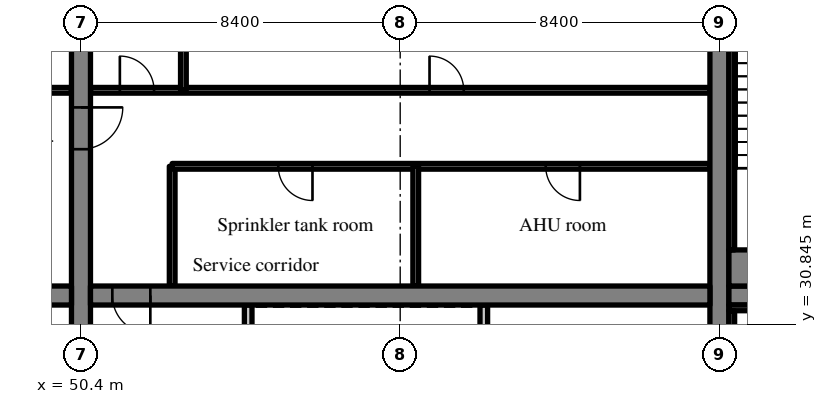
"""IFC4 building model, lengths in metres.
Left out: names, types, materials, properties, quantities, classifications, styles, units other than length and angle.
Written with IfcOpenShell. Run it as: python <this file> out.ifc"""

import sys

from ifc_helpers import new_model, si_unit, direction, frame, frame_2d, origin, place, context, subcontext, project, spatial, rectangle, extrude, source, transform, mapped, element, fill, save


model = new_model("IFC4")
c1 = context("Model", 3, precision=1e-05, world=origin(), true_north=direction((0.0, 1.0)))
c2 = subcontext(c1, "Body", "Model", "MODEL_VIEW")
j1 = project(units=[si_unit("LENGTHUNIT", "METRE"), si_unit("PLANEANGLEUNIT", "RADIAN")], contexts=[c1])
p1 = place(None, origin())
s1 = spatial("IfcSite", under=j1, at=p1, CompositionType="ELEMENT")
p2 = place(p1, origin())
s2 = spatial("IfcBuilding", under=s1, at=p2, CompositionType="ELEMENT")
p3 = place(p2, frame((0.0, 0.0, 140.8)))
s3 = spatial("IfcBuildingStorey", under=s2, at=p3, CompositionType="ELEMENT", Elevation=140.8)
m1 = source(origin(), c2, "Body", "SweptSolid", [
    extrude(rectangle(XDim=18.2, YDim=0.5, at=frame_2d((9.1, 0.0))), origin(), (0.0, 0.0, 1.0), 5.12),
])
p4 = place(p3, frame((50.4, 22.9, 0.0), z_axis=(0.0, 0.0, 1.0), x_axis=(0.0, 1.0, 0.0)))
e1 = element("IfcWall", 1, at=p4, inside=s3, PredefinedType="SHEAR", context=c2, shape_type="MappedRepresentation", body=[
    mapped(m1, transform((0.0, 0.0, 0.0), scale=1.0)),
])
m2 = source(origin(), c2, "Body", "SweptSolid", [
    extrude(rectangle(XDim=1.1, YDim=2.1, at=frame_2d((0.55, 1.05))), frame((0.0, 0.26, 0.0), z_axis=(0.0, -1.0, 0.0), x_axis=(1.0, 0.0, 0.0)), (0.0, 0.0, 1.0), 0.52),
])
p5 = place(p4, frame((12.55, 0.0, 0.0)))
e2 = element("IfcOpeningElement", 2, at=p5, cuts=e1, PredefinedType="OPENING", context=c2, shape_type="MappedRepresentation", body=[
    mapped(m2, transform((0.0, 0.0, 0.0), scale=1.0)),
])
p6 = place(p3, frame((67.2, 22.9, 0.0), z_axis=(0.0, 0.0, 1.0), x_axis=(0.0, 1.0, 0.0)))
e3 = element("IfcWall", 3, at=p6, inside=s3, PredefinedType="SHEAR", context=c2, shape_type="MappedRepresentation", body=[
    mapped(m1, transform((0.0, 0.0, 0.0), scale=1.0)),
])
m3 = source(origin(), c2, "Body", "SweptSolid", [
    extrude(rectangle(XDim=16.3, YDim=0.5, at=frame_2d((8.15, 0.0))), origin(), (0.0, 0.0, 1.0), 5.12),
])
p7 = place(p3, frame((33.85, 31.6, 0.0), z_axis=(0.0, 0.0, 1.0), x_axis=(1.0, 0.0, 0.0)))
e4 = element("IfcWall", 4, at=p7, inside=s3, PredefinedType="SHEAR", context=c2, shape_type="MappedRepresentation", body=[
    mapped(m3, transform((0.0, 0.0, 0.0), scale=1.0)),
])
m4 = source(origin(), c2, "Body", "SweptSolid", [
    extrude(rectangle(XDim=1.0, YDim=2.1, at=frame_2d((0.5, 1.05))), frame((0.0, 0.26, 0.0), z_axis=(0.0, -1.0, 0.0), x_axis=(1.0, 0.0, 0.0)), (0.0, 0.0, 1.0), 0.52),
])
p8 = place(p7, frame((14.725, 0.0, 0.0)))
e5 = element("IfcOpeningElement", 5, at=p8, cuts=e4, PredefinedType="OPENING", context=c2, shape_type="MappedRepresentation", body=[
    mapped(m4, transform((0.0, 0.0, 0.0), scale=1.0)),
])
m5 = source(origin(), c2, "Body", "SweptSolid", [
    extrude(rectangle(XDim=16.3, YDim=0.5, at=frame_2d((8.15, 0.0))), origin(), (0.0, 0.0, 1.0), 5.12),
])
p9 = place(p3, frame((50.65, 31.6, 0.0), z_axis=(0.0, 0.0, 1.0), x_axis=(1.0, 0.0, 0.0)))
e6 = element("IfcWall", 6, at=p9, inside=s3, PredefinedType="SHEAR", context=c2, shape_type="MappedRepresentation", body=[
    mapped(m5, transform((0.0, 0.0, 0.0), scale=1.0)),
])
p10 = place(p9, frame((0.575, 0.0, 0.0)))
e7 = element("IfcOpeningElement", 7, at=p10, cuts=e6, PredefinedType="OPENING", context=c2, shape_type="MappedRepresentation", body=[
    mapped(m4, transform((0.0, 0.0, 0.0), scale=1.0)),
])
m6 = source(origin(), c2, "Body", "SweptSolid", [
    extrude(rectangle(XDim=7.25, YDim=0.5, at=frame_2d((3.625, 0.0))), origin(), (0.0, 0.0, 1.0), 5.12),
])
p11 = place(p3, frame((67.45, 31.6, 0.0), z_axis=(0.0, 0.0, 1.0), x_axis=(1.0, 0.0, 0.0)))
e8 = element("IfcWall", 8, at=p11, inside=s3, PredefinedType="SHEAR", context=c2, shape_type="MappedRepresentation", body=[
    mapped(m6, transform((0.0, 0.0, 0.0), scale=1.0)),
])
p12 = place(p11, frame((5.575, 0.0, 0.0)))
e9 = element("IfcOpeningElement", 9, at=p12, cuts=e8, PredefinedType="OPENING", context=c2, shape_type="MappedRepresentation", body=[
    mapped(m2, transform((0.0, 0.0, 0.0), scale=1.0)),
])
m7 = source(origin(), c2, "Body", "SweptSolid", [
    extrude(rectangle(XDim=16.3, YDim=0.15, at=frame_2d((8.15, 0.0))), origin(), (0.0, 0.0, 1.0), 5.12),
])
p13 = place(p3, frame((33.85, 37.0, 0.0), z_axis=(0.0, 0.0, 1.0), x_axis=(1.0, 0.0, 0.0)))
e10 = element("IfcWall", 10, at=p13, inside=s3, PredefinedType="PARTITIONING", context=c2, shape_type="MappedRepresentation", body=[
    mapped(m7, transform((0.0, 0.0, 0.0), scale=1.0)),
])
m8 = source(origin(), c2, "Body", "SweptSolid", [
    extrude(rectangle(XDim=0.9, YDim=2.1, at=frame_2d((0.45, 1.05))), frame((0.0, 0.085, 0.0), z_axis=(0.0, -1.0, 0.0), x_axis=(1.0, 0.0, 0.0)), (0.0, 0.0, 1.0), 0.17),
])
p14 = place(p13, frame((0.773, 0.0, 0.0)))
e11 = element("IfcOpeningElement", 11, at=p14, cuts=e10, PredefinedType="OPENING", context=c2, shape_type="MappedRepresentation", body=[
    mapped(m8, transform((0.0, 0.0, 0.0), scale=1.0)),
])
p15 = place(p13, frame((3.625, 0.0, 0.0)))
e12 = element("IfcOpeningElement", 12, at=p15, cuts=e10, PredefinedType="OPENING", context=c2, shape_type="MappedRepresentation", body=[
    mapped(m8, transform((0.0, 0.0, 0.0), scale=1.0)),
])
p16 = place(p13, frame((9.33, 0.0, 0.0)))
e13 = element("IfcOpeningElement", 13, at=p16, cuts=e10, PredefinedType="OPENING", context=c2, shape_type="MappedRepresentation", body=[
    mapped(m8, transform((0.0, 0.0, 0.0), scale=1.0)),
])
p17 = place(p13, frame((14.627, 0.0, 0.0)))
e14 = element("IfcOpeningElement", 14, at=p17, cuts=e10, PredefinedType="OPENING", context=c2, shape_type="MappedRepresentation", body=[
    mapped(m8, transform((0.0, 0.0, 0.0), scale=1.0)),
])
m9 = source(origin(), c2, "Body", "SweptSolid", [
    extrude(rectangle(XDim=2.55, YDim=0.2, at=frame_2d((1.275, 0.0))), origin(), (0.0, 0.0, 1.0), 5.12),
])
for number, where, z_axis, x_axis in (
    (15, (54.8, 28.8, 0.0), (0.0, 0.0, 1.0), (0.0, 1.0, 0.0)),
    (16, (61.0, 28.8, 0.0), (0.0, 0.0, 1.0), (0.0, 1.0, 0.0)),
):
    element("IfcWall", number, at=place(p3, frame(where, z_axis=z_axis, x_axis=x_axis)), inside=s3, PredefinedType="SOLIDWALL", context=c2, shape_type="MappedRepresentation", body=[
        mapped(m9, transform((0.0, 0.0, 0.0), scale=1.0)),
    ])
m10 = source(origin(), c2, "Body", "SweptSolid", [
    extrude(rectangle(XDim=3.15, YDim=0.15, at=frame_2d((1.575, 0.0))), origin(), (0.0, 0.0, 1.0), 5.12),
])
p18 = place(p3, frame((52.8, 31.85, 0.0), z_axis=(0.0, 0.0, 1.0), x_axis=(0.0, 1.0, 0.0)))
e17 = element("IfcWall", 17, at=p18, inside=s3, PredefinedType="PARTITIONING", context=c2, shape_type="MappedRepresentation", body=[
    mapped(m10, transform((0.0, 0.0, 0.0), scale=1.0)),
])
m11 = source(origin(), c2, "Body", "SweptSolid", [
    extrude(rectangle(XDim=14.15, YDim=0.15, at=frame_2d((7.075, 0.0))), origin(), (0.0, 0.0, 1.0), 5.12),
])
p19 = place(p3, frame((66.95, 35.0, 0.0), z_axis=(0.0, 0.0, 1.0), x_axis=(-1.0, 0.0, 0.0)))
e18 = element("IfcWall", 18, at=p19, inside=s3, PredefinedType="PARTITIONING", context=c2, shape_type="MappedRepresentation", body=[
    mapped(m11, transform((0.0, 0.0, 0.0), scale=1.0)),
])
p20 = place(p19, frame((3.421, 0.0, 0.0)))
e19 = element("IfcOpeningElement", 19, at=p20, cuts=e18, PredefinedType="OPENING", context=c2, shape_type="MappedRepresentation", body=[
    mapped(m8, transform((0.0, 0.0, 0.0), scale=1.0)),
])
p21 = place(p19, frame((10.458, 0.0, 0.0)))
e20 = element("IfcOpeningElement", 20, at=p21, cuts=e18, PredefinedType="OPENING", context=c2, shape_type="MappedRepresentation", body=[
    mapped(m8, transform((0.0, 0.0, 0.0), scale=1.0)),
])
m12 = source(origin(), c2, "Body", "SweptSolid", [
    extrude(rectangle(XDim=16.3, YDim=0.15, at=frame_2d((8.15, 0.0))), origin(), (0.0, 0.0, 1.0), 5.12),
])
p22 = place(p3, frame((66.95, 37.0, 0.0), z_axis=(0.0, 0.0, 1.0), x_axis=(-1.0, 0.0, 0.0)))
e21 = element("IfcWall", 21, at=p22, inside=s3, PredefinedType="PARTITIONING", context=c2, shape_type="MappedRepresentation", body=[
    mapped(m12, transform((0.0, 0.0, 0.0), scale=1.0)),
])
p23 = place(p22, frame((6.478, 0.0, 0.0)))
e22 = element("IfcOpeningElement", 22, at=p23, cuts=e21, PredefinedType="OPENING", context=c2, shape_type="MappedRepresentation", body=[
    mapped(m8, transform((0.0, 0.0, 0.0), scale=1.0)),
])
p24 = place(p22, frame((14.627, 0.0, 0.0)))
e23 = element("IfcOpeningElement", 23, at=p24, cuts=e21, PredefinedType="OPENING", context=c2, shape_type="MappedRepresentation", body=[
    mapped(m8, transform((0.0, 0.0, 0.0), scale=1.0)),
])
p25 = place(p3, frame((59.209, 31.85, 0.0), z_axis=(0.0, 0.0, 1.0), x_axis=(0.0, 1.0, 0.0)))
e24 = element("IfcWall", 24, at=p25, inside=s3, PredefinedType="PARTITIONING", context=c2, shape_type="MappedRepresentation", body=[
    mapped(m10, transform((0.0, 0.0, 0.0), scale=1.0)),
])
m13 = source(origin(), c2, "Body", "SweptSolid", [
    extrude(rectangle(XDim=4.1, YDim=0.15, at=frame_2d((2.05, 0.0))), origin(), (0.0, 0.0, 1.0), 5.12),
])
p26 = place(p3, frame((53.095, 37.0, 0.0), z_axis=(0.0, 0.0, 1.0), x_axis=(0.0, 1.0, 0.0)))
e25 = element("IfcWall", 25, at=p26, inside=s3, PredefinedType="PARTITIONING", context=c2, shape_type="MappedRepresentation", body=[
    mapped(m13, transform((0.0, 0.0, 0.0), scale=1.0)),
])
m14 = source(origin(), c2, "Body", "SweptSolid", [
    extrude(rectangle(XDim=4.8, YDim=0.15, at=frame_2d((2.4, 0.0))), origin(), (0.0, 0.0, 1.0), 5.12),
])
p27 = place(p3, frame((67.45, 31.275, 0.0), z_axis=(0.0, 0.0, 1.0), x_axis=(1.0, 0.0, 0.0)))
e26 = element("IfcWall", 26, at=p27, inside=s3, PredefinedType="SOLIDWALL", context=c2, shape_type="MappedRepresentation", body=[
    mapped(m14, transform((0.0, 0.0, 0.0), scale=1.0)),
])
m15 = source(origin(), c2, "Body", "SweptSolid", [
    extrude(rectangle(XDim=8.1, YDim=0.15, at=frame_2d((4.05, 0.0))), origin(), (0.0, 0.0, 1.0), 5.12),
])
p28 = place(p3, frame((67.525, 23.1, 0.0), z_axis=(0.0, 0.0, 1.0), x_axis=(0.0, 1.0, 0.0)))
e27 = element("IfcWall", 27, at=p28, inside=s3, PredefinedType="SOLIDWALL", context=c2, shape_type="MappedRepresentation", body=[
    mapped(m15, transform((0.0, 0.0, 0.0), scale=1.0)),
])
m16 = source(origin(), c2, "Body", "SweptSolid", [
    extrude(rectangle(XDim=4.8, YDim=0.95, at=frame_2d((2.4, 0.0))), origin(), (0.0, 0.0, 1.0), 5.12),
])
p29 = place(p3, frame((67.45, 32.325, 0.0), z_axis=(0.0, 0.0, 1.0), x_axis=(1.0, 0.0, 0.0)))
e28 = element("IfcWall", 28, at=p29, inside=s3, PredefinedType="SOLIDWALL", context=c2, shape_type="MappedRepresentation", body=[
    mapped(m16, transform((0.0, 0.0, 0.0), scale=1.0)),
])
p30 = place(p3, frame((67.525, 32.8, 0.0), z_axis=(0.0, 0.0, 1.0), x_axis=(0.0, 1.0, 0.0)))
e29 = element("IfcWall", 29, at=p30, inside=s3, PredefinedType="SOLIDWALL", context=c2, shape_type="MappedRepresentation", body=[
    mapped(m15, transform((0.0, 0.0, 0.0), scale=1.0)),
])
m17 = source(origin(), c2, "Body", "SweptSolid", [
    extrude(rectangle(XDim=1.0, YDim=2.1, at=frame_2d((0.5, 1.05))), frame((0.0, 0.025, 0.0), z_axis=(0.0, -1.0, 0.0), x_axis=(1.0, 0.0, 0.0)), (0.0, 0.0, 1.0), 0.05),
])
p31 = place(p10, origin())
e30 = element("IfcDoor", 30, at=p31, inside=s3, OperationType="SINGLE_SWING_RIGHT", PredefinedType="DOOR", context=c2, shape_type="MappedRepresentation", body=[
    mapped(m17, transform((0.0, 0.0, 0.0), scale=1.0)),
])
fill(e7, e30)
m18 = source(origin(), c2, "Body", "SweptSolid", [
    extrude(rectangle(XDim=0.9, YDim=2.1, at=frame_2d((0.45, 1.05))), frame((0.0, 0.025, 0.0), z_axis=(0.0, -1.0, 0.0), x_axis=(1.0, 0.0, 0.0)), (0.0, 0.0, 1.0), 0.05),
])
p32 = place(p20, origin())
e31 = element("IfcDoor", 31, at=p32, inside=s3, OperationType="SINGLE_SWING_LEFT", PredefinedType="DOOR", context=c2, shape_type="MappedRepresentation", body=[
    mapped(m18, transform((0.0, 0.0, 0.0), scale=1.0)),
])
fill(e19, e31)
p33 = place(p21, origin())
e32 = element("IfcDoor", 32, at=p33, inside=s3, OperationType="SINGLE_SWING_LEFT", PredefinedType="DOOR", context=c2, shape_type="MappedRepresentation", body=[
    mapped(m18, transform((0.0, 0.0, 0.0), scale=1.0)),
])
fill(e20, e32)
p34 = place(p23, origin())
e33 = element("IfcDoor", 33, at=p34, inside=s3, OperationType="SINGLE_SWING_RIGHT", PredefinedType="DOOR", context=c2, shape_type="MappedRepresentation", body=[
    mapped(m18, transform((0.0, 0.0, 0.0), scale=1.0)),
])
fill(e22, e33)
p35 = place(p24, origin())
e34 = element("IfcDoor", 34, at=p35, inside=s3, OperationType="SINGLE_SWING_RIGHT", PredefinedType="DOOR", context=c2, shape_type="MappedRepresentation", body=[
    mapped(m18, transform((0.0, 0.0, 0.0), scale=1.0)),
])
fill(e23, e34)
m19 = source(origin(), c2, "Body", "SweptSolid", [
    extrude(rectangle(XDim=1.1, YDim=2.1, at=frame_2d((0.55, 1.05))), frame((0.0, 0.025, 0.0), z_axis=(0.0, -1.0, 0.0), x_axis=(1.0, 0.0, 0.0)), (0.0, 0.0, 1.0), 0.05),
])
p36 = place(p5, origin())
e35 = element("IfcDoor", 35, at=p36, inside=s3, OperationType="SINGLE_SWING_RIGHT", PredefinedType="DOOR", context=c2, shape_type="MappedRepresentation", body=[
    mapped(m19, transform((0.0, 0.0, 0.0), scale=1.0)),
])
fill(e2, e35)
save(model, sys.argv[1])
